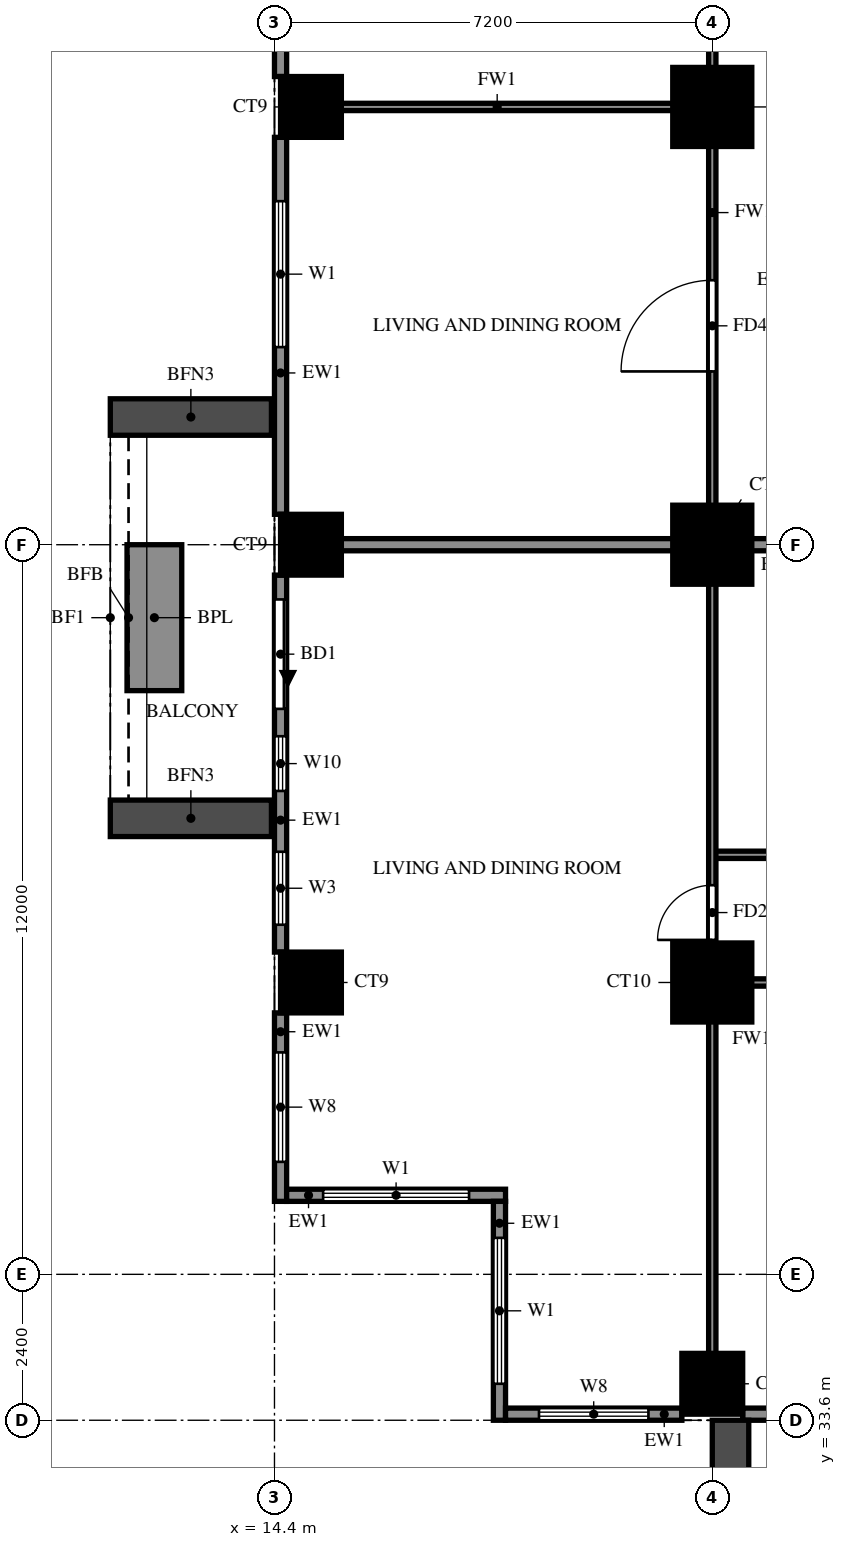
"""IFC4 building model, lengths in metres.
Left out: names, types, materials, properties, quantities, classifications, styles, units other than length and angle.
Written with IfcOpenShell. Run it as: python <this file> out.ifc"""

import sys

from ifc_helpers import new_model, si_unit, direction, frame, frame_2d, origin, origin_2d, place, context, subcontext, project, spatial, rectangle, extrude, source, transform, mapped, element, fill, save


model = new_model("IFC4")
c1 = context("Model", 3, precision=1e-05, world=origin(), true_north=direction((0.0, 1.0)))
c2 = subcontext(c1, "Body", "Model", "MODEL_VIEW")
j1 = project(units=[si_unit("LENGTHUNIT", "METRE"), si_unit("PLANEANGLEUNIT", "RADIAN")], contexts=[c1])
p1 = place(None, origin())
s1 = spatial("IfcSite", under=j1, at=p1, CompositionType="ELEMENT")
p2 = place(p1, origin())
s2 = spatial("IfcBuilding", under=s1, at=p2, CompositionType="ELEMENT")
p3 = place(p2, frame((0.0, 0.0, 72.5)))
s3 = spatial("IfcBuildingStorey", under=s2, at=p3, CompositionType="ELEMENT", Elevation=72.5)
m1 = source(origin(), c2, "Body", "SweptSolid", [
    extrude(rectangle(XDim=1.0, YDim=1.0, at=origin_2d()), origin(), (0.0, 0.0, 1.0), 3.18),
])
for number, where, z_axis, x_axis in (
    (1, (21.6, 34.2, 0.0), (0.0, 0.0, 1.0), (1.0, 0.0, 0.0)),
    (2, (15.0, 40.8, 0.0), (0.0, 0.0, 1.0), (1.0, 0.0, 0.0)),
):
    element("IfcColumn", number, at=place(p3, frame(where, z_axis=z_axis, x_axis=x_axis)), inside=s3, PredefinedType="COLUMN", context=c2, shape_type="MappedRepresentation", body=[
        mapped(m1, transform((0.0, 0.0, 0.0))),
    ])
m2 = source(origin(), c2, "Body", "SweptSolid", [
    extrude(rectangle(XDim=1.3, YDim=1.3, at=origin_2d()), origin(), (0.0, 0.0, 1.0), 3.18),
])
p4 = place(p3, frame((21.6, 40.8, 0.0), z_axis=(0.0, 0.0, 1.0), x_axis=(1.0, 0.0, 0.0)))
e3 = element("IfcColumn", 3, at=p4, inside=s3, PredefinedType="COLUMN", context=c2, shape_type="MappedRepresentation", body=[
    mapped(m2, transform((0.0, 0.0, 0.0))),
])
p5 = place(p3, frame((15.0, 48.0, 0.0), z_axis=(0.0, 0.0, 1.0), x_axis=(1.0, 0.0, 0.0)))
e4 = element("IfcColumn", 4, at=p5, inside=s3, PredefinedType="COLUMN", context=c2, shape_type="MappedRepresentation", body=[
    mapped(m1, transform((0.0, 0.0, 0.0))),
])
p6 = place(p3, frame((21.6, 48.0, 0.0), z_axis=(0.0, 0.0, 1.0), x_axis=(1.0, 0.0, 0.0)))
e5 = element("IfcColumn", 5, at=p6, inside=s3, PredefinedType="COLUMN", context=c2, shape_type="MappedRepresentation", body=[
    mapped(m2, transform((0.0, 0.0, 0.0))),
])
p7 = place(p3, frame((15.0, 55.2, 0.0), z_axis=(0.0, 0.0, 1.0), x_axis=(1.0, 0.0, 0.0)))
e6 = element("IfcColumn", 6, at=p7, inside=s3, PredefinedType="COLUMN", context=c2, shape_type="MappedRepresentation", body=[
    mapped(m1, transform((0.0, 0.0, 0.0))),
])
p8 = place(p3, frame((21.6, 55.2, 0.0), z_axis=(0.0, 0.0, 1.0), x_axis=(1.0, 0.0, 0.0)))
e7 = element("IfcColumn", 7, at=p8, inside=s3, PredefinedType="COLUMN", context=c2, shape_type="MappedRepresentation", body=[
    mapped(m2, transform((0.0, 0.0, 0.0))),
])
p9 = place(p3, frame((14.5, 61.9, 0.0), z_axis=(0.0, 0.0, 1.0), x_axis=(0.0, -1.0, 0.0)))
e8 = element("IfcWall", 8, at=p9, inside=s3, PredefinedType="SOLIDWALL", context=c2, shape_type="SweptSolid", body=[
    extrude(rectangle(XDim=6.2, YDim=0.2, at=frame_2d((3.1, 0.0))), origin(), (0.0, 0.0, 1.0), 3.18),
])
p10 = place(p9, frame((0.4, 0.0, 0.0)))
e9 = element("IfcOpeningElement", 9, at=p10, cuts=e8, PredefinedType="OPENING", context=c2, shape_type="SweptSolid", body=[
    extrude(rectangle(XDim=1.8, YDim=2.4, at=frame_2d((0.9, 1.2))), frame((0.0, 0.11, 0.0), z_axis=(0.0, -1.0, 0.0), x_axis=(1.0, 0.0, 0.0)), (0.0, 0.0, 1.0), 0.22),
])
p11 = place(p9, frame((4.55, 0.0, 0.6)))
e10 = element("IfcOpeningElement", 10, at=p11, cuts=e8, PredefinedType="OPENING", context=c2, shape_type="SweptSolid", body=[
    extrude(rectangle(XDim=1.2, YDim=2.4, at=frame_2d((0.6, 1.2))), frame((0.0, 0.11, 0.0), z_axis=(0.0, -1.0, 0.0), x_axis=(1.0, 0.0, 0.0)), (0.0, 0.0, 1.0), 0.22),
])
p12 = place(p3, frame((14.5, 54.7, 0.0), z_axis=(0.0, 0.0, 1.0), x_axis=(0.0, -1.0, 0.0)))
e11 = element("IfcWall", 11, at=p12, inside=s3, PredefinedType="SOLIDWALL", context=c2, shape_type="SweptSolid", body=[
    extrude(rectangle(XDim=6.2, YDim=0.2, at=frame_2d((3.1, 0.0))), origin(), (0.0, 0.0, 1.0), 3.18),
])
p13 = place(p12, frame((1.05, 0.0, 0.6)))
e12 = element("IfcOpeningElement", 12, at=p13, cuts=e11, PredefinedType="OPENING", context=c2, shape_type="SweptSolid", body=[
    extrude(rectangle(XDim=2.4, YDim=2.4, at=frame_2d((1.2, 1.2))), frame((0.0, 0.11, 0.0), z_axis=(0.0, -1.0, 0.0), x_axis=(1.0, 0.0, 0.0)), (0.0, 0.0, 1.0), 0.22),
])
p14 = place(p3, frame((14.5, 47.5, 0.0), z_axis=(0.0, 0.0, 1.0), x_axis=(0.0, -1.0, 0.0)))
e13 = element("IfcWall", 13, at=p14, inside=s3, PredefinedType="SOLIDWALL", context=c2, shape_type="SweptSolid", body=[
    extrude(rectangle(XDim=6.2, YDim=0.2, at=frame_2d((3.1, 0.0))), origin(), (0.0, 0.0, 1.0), 3.18),
])
p15 = place(p14, frame((0.4, 0.0, 0.0)))
e14 = element("IfcOpeningElement", 14, at=p15, cuts=e13, PredefinedType="OPENING", context=c2, shape_type="SweptSolid", body=[
    extrude(rectangle(XDim=1.8, YDim=2.4, at=frame_2d((0.9, 1.2))), frame((0.0, 0.11, 0.0), z_axis=(0.0, -1.0, 0.0), x_axis=(1.0, 0.0, 0.0)), (0.0, 0.0, 1.0), 0.22),
])
p16 = place(p14, frame((2.65, 0.0, 0.6)))
e15 = element("IfcOpeningElement", 15, at=p16, cuts=e13, PredefinedType="OPENING", context=c2, shape_type="SweptSolid", body=[
    extrude(rectangle(XDim=0.9, YDim=2.4, at=frame_2d((0.45, 1.2))), frame((0.0, 0.11, 0.0), z_axis=(0.0, -1.0, 0.0), x_axis=(1.0, 0.0, 0.0)), (0.0, 0.0, 1.0), 0.22),
])
p17 = place(p14, frame((4.55, 0.0, 0.6)))
e16 = element("IfcOpeningElement", 16, at=p17, cuts=e13, PredefinedType="OPENING", context=c2, shape_type="SweptSolid", body=[
    extrude(rectangle(XDim=1.2, YDim=2.4, at=frame_2d((0.6, 1.2))), frame((0.0, 0.11, 0.0), z_axis=(0.0, -1.0, 0.0), x_axis=(1.0, 0.0, 0.0)), (0.0, 0.0, 1.0), 0.22),
])
p18 = place(p3, frame((14.5, 40.3, 0.0), z_axis=(0.0, 0.0, 1.0), x_axis=(0.0, -1.0, 0.0)))
e17 = element("IfcWall", 17, at=p18, inside=s3, PredefinedType="SOLIDWALL", context=c2, shape_type="SweptSolid", body=[
    extrude(rectangle(XDim=3.1, YDim=0.2, at=frame_2d((1.55, 0.0))), origin(), (0.0, 0.0, 1.0), 3.18),
])
p19 = place(p18, frame((0.65, 0.0, 0.6)))
e18 = element("IfcOpeningElement", 18, at=p19, cuts=e17, PredefinedType="OPENING", context=c2, shape_type="SweptSolid", body=[
    extrude(rectangle(XDim=1.8, YDim=2.4, at=frame_2d((0.9, 1.2))), frame((0.0, 0.11, 0.0), z_axis=(0.0, -1.0, 0.0), x_axis=(1.0, 0.0, 0.0)), (0.0, 0.0, 1.0), 0.22),
])
p20 = place(p3, frame((14.6, 37.3, 0.0), z_axis=(0.0, 0.0, 1.0), x_axis=(1.0, 0.0, 0.0)))
e19 = element("IfcWall", 19, at=p20, inside=s3, PredefinedType="SOLIDWALL", context=c2, shape_type="SweptSolid", body=[
    extrude(rectangle(XDim=3.6, YDim=0.2, at=frame_2d((1.8, 0.0))), origin(), (0.0, 0.0, 1.0), 3.18),
])
p21 = place(p20, frame((0.6, 0.0, 0.6)))
e20 = element("IfcOpeningElement", 20, at=p21, cuts=e19, PredefinedType="OPENING", context=c2, shape_type="SweptSolid", body=[
    extrude(rectangle(XDim=2.4, YDim=2.4, at=frame_2d((1.2, 1.2))), frame((0.0, 0.11, 0.0), z_axis=(0.0, -1.0, 0.0), x_axis=(1.0, 0.0, 0.0)), (0.0, 0.0, 1.0), 0.22),
])
p22 = place(p3, frame((18.1, 37.2, 0.0), z_axis=(0.0, 0.0, 1.0), x_axis=(0.0, -1.0, 0.0)))
e21 = element("IfcWall", 21, at=p22, inside=s3, PredefinedType="SOLIDWALL", context=c2, shape_type="SweptSolid", body=[
    extrude(rectangle(XDim=3.6, YDim=0.2, at=frame_2d((1.8, 0.0))), origin(), (0.0, 0.0, 1.0), 3.18),
])
p23 = place(p22, frame((0.6, 0.0, 0.6)))
e22 = element("IfcOpeningElement", 22, at=p23, cuts=e21, PredefinedType="OPENING", context=c2, shape_type="SweptSolid", body=[
    extrude(rectangle(XDim=2.4, YDim=2.4, at=frame_2d((1.2, 1.2))), frame((0.0, 0.11, 0.0), z_axis=(0.0, -1.0, 0.0), x_axis=(1.0, 0.0, 0.0)), (0.0, 0.0, 1.0), 0.22),
])
p24 = place(p3, frame((18.2, 33.7, 0.0), z_axis=(0.0, 0.0, 1.0), x_axis=(1.0, 0.0, 0.0)))
e23 = element("IfcWall", 23, at=p24, inside=s3, PredefinedType="SOLIDWALL", context=c2, shape_type="SweptSolid", body=[
    extrude(rectangle(XDim=2.9, YDim=0.2, at=frame_2d((1.45, 0.0))), origin(), (0.0, 0.0, 1.0), 3.18),
])
p25 = place(p24, frame((0.55, 0.0, 0.6)))
e24 = element("IfcOpeningElement", 24, at=p25, cuts=e23, PredefinedType="OPENING", context=c2, shape_type="SweptSolid", body=[
    extrude(rectangle(XDim=1.8, YDim=2.4, at=frame_2d((0.9, 1.2))), frame((0.0, 0.11, 0.0), z_axis=(0.0, -1.0, 0.0), x_axis=(1.0, 0.0, 0.0)), (0.0, 0.0, 1.0), 0.22),
])
p26 = place(p3, frame((22.1, 33.7, 0.0), z_axis=(0.0, 0.0, 1.0), x_axis=(1.0, 0.0, 0.0)))
e25 = element("IfcWall", 25, at=p26, inside=s3, PredefinedType="SOLIDWALL", context=c2, shape_type="SweptSolid", body=[
    extrude(rectangle(XDim=6.2, YDim=0.2, at=frame_2d((3.1, 0.0))), origin(), (0.0, 0.0, 1.0), 3.18),
])
p27 = place(p26, frame((1.0, 0.0, 0.0)))
e26 = element("IfcOpeningElement", 26, at=p27, cuts=e25, PredefinedType="OPENING", context=c2, shape_type="SweptSolid", body=[
    extrude(rectangle(XDim=1.8, YDim=2.4, at=frame_2d((0.9, 1.2))), frame((0.0, 0.11, 0.0), z_axis=(0.0, -1.0, 0.0), x_axis=(1.0, 0.0, 0.0)), (0.0, 0.0, 1.0), 0.22),
])
p28 = place(p26, frame((4.1, 0.0, 1.5)))
e27 = element("IfcOpeningElement", 27, at=p28, cuts=e25, PredefinedType="OPENING", context=c2, shape_type="SweptSolid", body=[
    extrude(rectangle(XDim=0.9, YDim=0.9, at=frame_2d((0.45, 0.45))), frame((0.0, 0.11, 0.0), z_axis=(0.0, -1.0, 0.0), x_axis=(1.0, 0.0, 0.0)), (0.0, 0.0, 1.0), 0.22),
])
for number, where, z_axis, x_axis in (
    (28, (14.35, 50.1, 0.0), (0.0, 0.0, 1.0), (-1.0, 0.0, 0.0)),
    (29, (14.35, 43.5, 0.0), (0.0, 0.0, 1.0), (-1.0, 0.0, 0.0)),
):
    element("IfcWall", number, at=place(p3, frame(where, z_axis=z_axis, x_axis=x_axis)), inside=s3, PredefinedType="SOLIDWALL", context=c2, shape_type="SweptSolid", body=[
        extrude(rectangle(XDim=2.65, YDim=0.6, at=frame_2d((1.325, 0.0))), origin(), (0.0, 0.0, 1.0), 2.85),
    ])
p29 = place(p3, frame((12.425, 48.0, 0.0), z_axis=(0.0, 0.0, 1.0), x_axis=(0.0, -1.0, 0.0)))
e30 = element("IfcWall", 30, at=p29, inside=s3, PredefinedType="SOLIDWALL", context=c2, shape_type="SweptSolid", body=[
    extrude(rectangle(XDim=2.4, YDim=0.9, at=frame_2d((1.2, 0.0))), origin(), (0.0, 0.0, 1.0), 0.9),
])
p30 = place(p3, frame((21.9, 33.6, 0.0), z_axis=(0.0, 0.0, 1.0), x_axis=(0.0, -1.0, 0.0)))
e31 = element("IfcWall", 31, at=p30, inside=s3, PredefinedType="SOLIDWALL", context=c2, shape_type="SweptSolid", body=[
    extrude(rectangle(XDim=2.7, YDim=0.6, at=frame_2d((1.35, 0.0))), origin(), (0.0, 0.0, 1.0), 2.85),
])
p31 = place(p3, frame((14.525, 48.0, 0.0), z_axis=(0.0, 0.0, 1.0), x_axis=(1.0, 0.0, 0.0)))
e32 = element("IfcWall", 32, at=p31, inside=s3, PredefinedType="SOLIDWALL", context=c2, shape_type="SweptSolid", body=[
    extrude(rectangle(XDim=14.275, YDim=0.2, at=frame_2d((7.138, 0.0))), origin(), (0.0, 0.0, 1.0), 3.18),
])
p32 = place(p3, frame((21.6, 40.8, 0.0), z_axis=(0.0, 0.0, 1.0), x_axis=(1.0, 0.0, 0.0)))
e33 = element("IfcWall", 33, at=p32, inside=s3, PredefinedType="PARTITIONING", context=c2, shape_type="SweptSolid", body=[
    extrude(rectangle(XDim=3.6, YDim=0.12, at=frame_2d((1.8, 0.0))), origin(), (0.0, 0.0, 1.0), 3.18),
])
p33 = place(p32, frame((1.35, 0.0, 0.0)))
e34 = element("IfcOpeningElement", 34, at=p33, cuts=e33, PredefinedType="OPENING", context=c2, shape_type="SweptSolid", body=[
    extrude(rectangle(XDim=0.9, YDim=2.1, at=frame_2d((0.45, 1.05))), frame((0.0, 0.07, 0.0), z_axis=(0.0, -1.0, 0.0), x_axis=(1.0, 0.0, 0.0)), (0.0, 0.0, 1.0), 0.14),
])
p34 = place(p3, frame((21.6, 42.9, 0.0), z_axis=(0.0, 0.0, 1.0), x_axis=(1.0, 0.0, 0.0)))
e35 = element("IfcWall", 35, at=p34, inside=s3, PredefinedType="PARTITIONING", context=c2, shape_type="SweptSolid", body=[
    extrude(rectangle(XDim=12.0, YDim=0.12, at=frame_2d((6.0, 0.0))), origin(), (0.0, 0.0, 1.0), 3.18),
])
p35 = place(p34, frame((2.1, 0.0, 0.0)))
e36 = element("IfcOpeningElement", 36, at=p35, cuts=e35, PredefinedType="OPENING", context=c2, shape_type="SweptSolid", body=[
    extrude(rectangle(XDim=0.9, YDim=2.1, at=frame_2d((0.45, 1.05))), frame((0.0, 0.07, 0.0), z_axis=(0.0, -1.0, 0.0), x_axis=(1.0, 0.0, 0.0)), (0.0, 0.0, 1.0), 0.14),
])
p36 = place(p34, frame((6.55, 0.0, 0.0)))
e37 = element("IfcOpeningElement", 37, at=p36, cuts=e35, PredefinedType="OPENING", context=c2, shape_type="SweptSolid", body=[
    extrude(rectangle(XDim=0.9, YDim=2.1, at=frame_2d((0.45, 1.05))), frame((0.0, 0.07, 0.0), z_axis=(0.0, -1.0, 0.0), x_axis=(1.0, 0.0, 0.0)), (0.0, 0.0, 1.0), 0.14),
])
p37 = place(p34, frame((10.0, 0.0, 0.0)))
e38 = element("IfcOpeningElement", 38, at=p37, cuts=e35, PredefinedType="OPENING", context=c2, shape_type="SweptSolid", body=[
    extrude(rectangle(XDim=0.9, YDim=2.1, at=frame_2d((0.45, 1.05))), frame((0.0, 0.07, 0.0), z_axis=(0.0, -1.0, 0.0), x_axis=(1.0, 0.0, 0.0)), (0.0, 0.0, 1.0), 0.14),
])
p38 = place(p3, frame((14.525, 55.2, 0.0), z_axis=(0.0, 0.0, 1.0), x_axis=(1.0, 0.0, 0.0)))
e39 = element("IfcWall", 39, at=p38, inside=s3, PredefinedType="PARTITIONING", context=c2, shape_type="SweptSolid", body=[
    extrude(rectangle(XDim=7.075, YDim=0.12, at=frame_2d((3.538, 0.0))), origin(), (0.0, 0.0, 1.0), 3.18),
])
p39 = place(p3, frame((21.6, 33.725, 0.0), z_axis=(0.0, 0.0, 1.0), x_axis=(0.0, 1.0, 0.0)))
e40 = element("IfcWall", 40, at=p39, inside=s3, PredefinedType="PARTITIONING", context=c2, shape_type="SweptSolid", body=[
    extrude(rectangle(XDim=39.475, YDim=0.12, at=frame_2d((19.737, 0.0))), origin(), (0.0, 0.0, 1.0), 3.18),
])
p40 = place(p39, frame((7.775, 0.0, 0.0)))
e41 = element("IfcOpeningElement", 41, at=p40, cuts=e40, PredefinedType="OPENING", context=c2, shape_type="SweptSolid", body=[
    extrude(rectangle(XDim=0.9, YDim=2.1, at=frame_2d((0.45, 1.05))), frame((0.0, 0.07, 0.0), z_axis=(0.0, -1.0, 0.0), x_axis=(1.0, 0.0, 0.0)), (0.0, 0.0, 1.0), 0.14),
])
p41 = place(p39, frame((17.125, 0.0, 0.0)))
e42 = element("IfcOpeningElement", 42, at=p41, cuts=e40, PredefinedType="OPENING", context=c2, shape_type="SweptSolid", body=[
    extrude(rectangle(XDim=1.5, YDim=2.1, at=frame_2d((0.75, 1.05))), frame((0.0, 0.07, 0.0), z_axis=(0.0, -1.0, 0.0), x_axis=(1.0, 0.0, 0.0)), (0.0, 0.0, 1.0), 0.14),
])
p42 = place(p39, frame((22.825, 0.0, 0.0)))
e43 = element("IfcOpeningElement", 43, at=p42, cuts=e40, PredefinedType="OPENING", context=c2, shape_type="SweptSolid", body=[
    extrude(rectangle(XDim=0.9, YDim=2.1, at=frame_2d((0.45, 1.05))), frame((0.0, 0.07, 0.0), z_axis=(0.0, -1.0, 0.0), x_axis=(1.0, 0.0, 0.0)), (0.0, 0.0, 1.0), 0.14),
])
p43 = place(p39, frame((26.425, 0.0, 0.0)))
e44 = element("IfcOpeningElement", 44, at=p43, cuts=e40, PredefinedType="OPENING", context=c2, shape_type="SweptSolid", body=[
    extrude(rectangle(XDim=0.9, YDim=2.1, at=frame_2d((0.45, 1.05))), frame((0.0, 0.07, 0.0), z_axis=(0.0, -1.0, 0.0), x_axis=(1.0, 0.0, 0.0)), (0.0, 0.0, 1.0), 0.14),
])
p44 = place(p39, frame((30.025, 0.0, 0.0)))
e45 = element("IfcOpeningElement", 45, at=p44, cuts=e40, PredefinedType="OPENING", context=c2, shape_type="SweptSolid", body=[
    extrude(rectangle(XDim=0.9, YDim=2.1, at=frame_2d((0.45, 1.05))), frame((0.0, 0.07, 0.0), z_axis=(0.0, -1.0, 0.0), x_axis=(1.0, 0.0, 0.0)), (0.0, 0.0, 1.0), 0.14),
])
p45 = place(p39, frame((33.625, 0.0, 0.0)))
e46 = element("IfcOpeningElement", 46, at=p45, cuts=e40, PredefinedType="OPENING", context=c2, shape_type="SweptSolid", body=[
    extrude(rectangle(XDim=0.9, YDim=2.1, at=frame_2d((0.45, 1.05))), frame((0.0, 0.07, 0.0), z_axis=(0.0, -1.0, 0.0), x_axis=(1.0, 0.0, 0.0)), (0.0, 0.0, 1.0), 0.14),
])
p46 = place(p39, frame((37.225, 0.0, 0.0)))
e47 = element("IfcOpeningElement", 47, at=p46, cuts=e40, PredefinedType="OPENING", context=c2, shape_type="SweptSolid", body=[
    extrude(rectangle(XDim=0.9, YDim=2.1, at=frame_2d((0.45, 1.05))), frame((0.0, 0.07, 0.0), z_axis=(0.0, -1.0, 0.0), x_axis=(1.0, 0.0, 0.0)), (0.0, 0.0, 1.0), 0.14),
])
p47 = place(p13, origin())
e48 = element("IfcWindow", 48, at=p47, inside=s3, PartitioningType="DOUBLE_PANEL_VERTICAL", PredefinedType="WINDOW", context=c2, shape_type="SweptSolid", body=[
    extrude(rectangle(XDim=2.4, YDim=2.4, at=frame_2d((1.2, 1.2))), frame((0.0, 0.03, 0.0), z_axis=(0.0, -1.0, 0.0), x_axis=(1.0, 0.0, 0.0)), (0.0, 0.0, 1.0), 0.06),
])
fill(e12, e48)
p48 = place(p15, origin())
e49 = element("IfcDoor", 49, at=p48, inside=s3, OperationType="DOUBLE_DOOR_SLIDING", PredefinedType="DOOR", context=c2, shape_type="SweptSolid", body=[
    extrude(rectangle(XDim=1.8, YDim=2.4, at=frame_2d((0.9, 1.2))), frame((0.0, 0.025, 0.0), z_axis=(0.0, -1.0, 0.0), x_axis=(1.0, 0.0, 0.0)), (0.0, 0.0, 1.0), 0.05),
])
fill(e14, e49)
p49 = place(p16, origin())
e50 = element("IfcWindow", 50, at=p49, inside=s3, PartitioningType="SINGLE_PANEL", PredefinedType="WINDOW", context=c2, shape_type="SweptSolid", body=[
    extrude(rectangle(XDim=0.9, YDim=2.4, at=frame_2d((0.45, 1.2))), frame((0.0, 0.03, 0.0), z_axis=(0.0, -1.0, 0.0), x_axis=(1.0, 0.0, 0.0)), (0.0, 0.0, 1.0), 0.06),
])
fill(e15, e50)
p50 = place(p17, origin())
e51 = element("IfcWindow", 51, at=p50, inside=s3, PartitioningType="SINGLE_PANEL", PredefinedType="WINDOW", context=c2, shape_type="SweptSolid", body=[
    extrude(rectangle(XDim=1.2, YDim=2.4, at=frame_2d((0.6, 1.2))), frame((0.0, 0.03, 0.0), z_axis=(0.0, -1.0, 0.0), x_axis=(1.0, 0.0, 0.0)), (0.0, 0.0, 1.0), 0.06),
])
fill(e16, e51)
p51 = place(p19, origin())
e52 = element("IfcWindow", 52, at=p51, inside=s3, PartitioningType="DOUBLE_PANEL_VERTICAL", PredefinedType="WINDOW", context=c2, shape_type="SweptSolid", body=[
    extrude(rectangle(XDim=1.8, YDim=2.4, at=frame_2d((0.9, 1.2))), frame((0.0, 0.03, 0.0), z_axis=(0.0, -1.0, 0.0), x_axis=(1.0, 0.0, 0.0)), (0.0, 0.0, 1.0), 0.06),
])
fill(e18, e52)
p52 = place(p21, origin())
e53 = element("IfcWindow", 53, at=p52, inside=s3, PartitioningType="DOUBLE_PANEL_VERTICAL", PredefinedType="WINDOW", context=c2, shape_type="SweptSolid", body=[
    extrude(rectangle(XDim=2.4, YDim=2.4, at=frame_2d((1.2, 1.2))), frame((0.0, 0.03, 0.0), z_axis=(0.0, -1.0, 0.0), x_axis=(1.0, 0.0, 0.0)), (0.0, 0.0, 1.0), 0.06),
])
fill(e20, e53)
p53 = place(p23, origin())
e54 = element("IfcWindow", 54, at=p53, inside=s3, PartitioningType="DOUBLE_PANEL_VERTICAL", PredefinedType="WINDOW", context=c2, shape_type="SweptSolid", body=[
    extrude(rectangle(XDim=2.4, YDim=2.4, at=frame_2d((1.2, 1.2))), frame((0.0, 0.03, 0.0), z_axis=(0.0, -1.0, 0.0), x_axis=(1.0, 0.0, 0.0)), (0.0, 0.0, 1.0), 0.06),
])
fill(e22, e54)
p54 = place(p25, origin())
e55 = element("IfcWindow", 55, at=p54, inside=s3, PartitioningType="DOUBLE_PANEL_VERTICAL", PredefinedType="WINDOW", context=c2, shape_type="SweptSolid", body=[
    extrude(rectangle(XDim=1.8, YDim=2.4, at=frame_2d((0.9, 1.2))), frame((0.0, 0.03, 0.0), z_axis=(0.0, -1.0, 0.0), x_axis=(1.0, 0.0, 0.0)), (0.0, 0.0, 1.0), 0.06),
])
fill(e24, e55)
p55 = place(p40, origin())
e56 = element("IfcDoor", 56, at=p55, inside=s3, OperationType="SINGLE_SWING_RIGHT", PredefinedType="DOOR", context=c2, shape_type="SweptSolid", body=[
    extrude(rectangle(XDim=0.9, YDim=2.1, at=frame_2d((0.45, 1.05))), frame((0.0, 0.025, 0.0), z_axis=(0.0, -1.0, 0.0), x_axis=(1.0, 0.0, 0.0)), (0.0, 0.0, 1.0), 0.05),
])
fill(e41, e56)
p56 = place(p41, origin())
e57 = element("IfcDoor", 57, at=p56, inside=s3, OperationType="SINGLE_SWING_LEFT", PredefinedType="DOOR", context=c2, shape_type="SweptSolid", body=[
    extrude(rectangle(XDim=1.5, YDim=2.1, at=frame_2d((0.75, 1.05))), frame((0.0, 0.025, 0.0), z_axis=(0.0, -1.0, 0.0), x_axis=(1.0, 0.0, 0.0)), (0.0, 0.0, 1.0), 0.05),
])
fill(e42, e57)
save(model, sys.argv[1])
